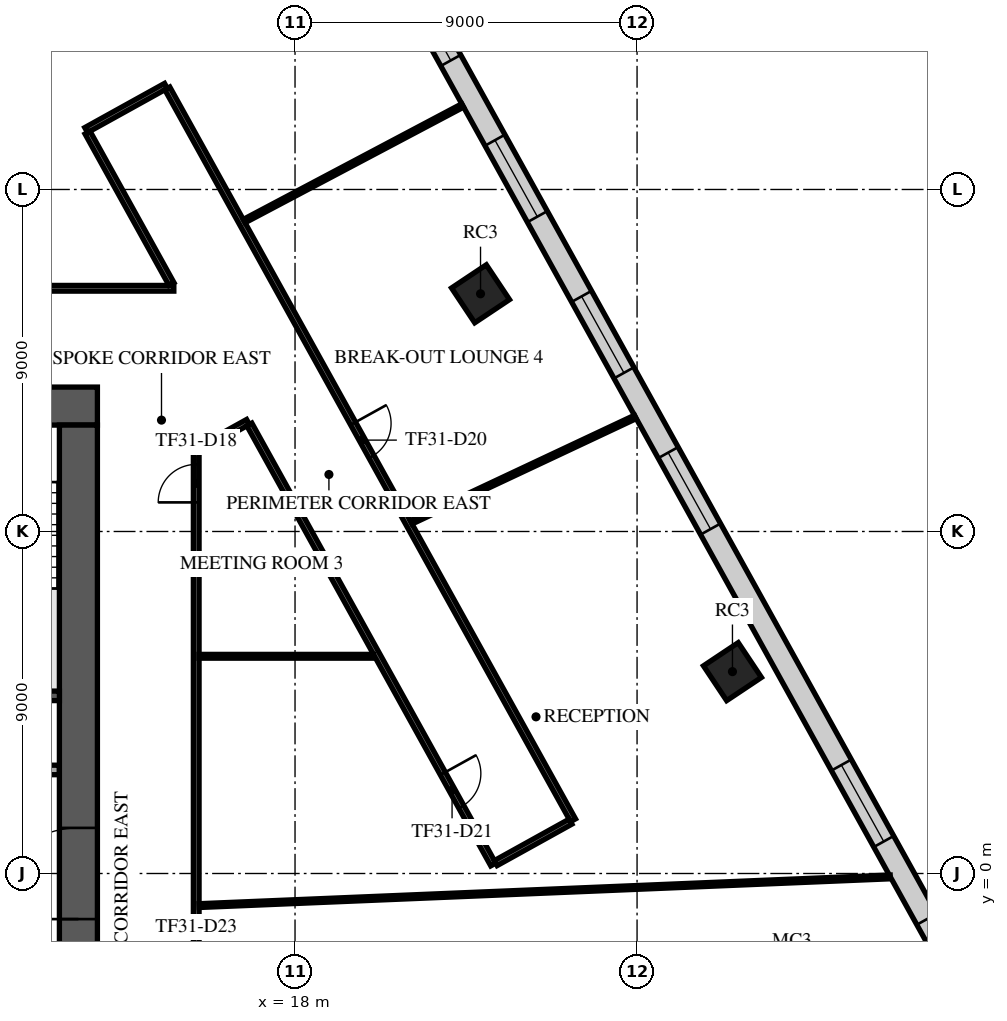
"""IFC4 building model, lengths in metres.
Left out: names, types, materials, properties, quantities, classifications, styles, units other than length and angle.
Written with IfcOpenShell. Run it as: python <this file> out.ifc"""

import sys

from ifc_helpers import new_model, si_unit, direction, frame, frame_2d, origin, origin_2d, place, context, subcontext, project, spatial, rectangle, extrude, element, fill, save


model = new_model("IFC4")
c1 = context("Model", 3, precision=1e-05, world=origin(), true_north=direction((0.0, 1.0)))
c2 = subcontext(c1, "Body", "Model", "MODEL_VIEW")
j1 = project(units=[si_unit("LENGTHUNIT", "METRE"), si_unit("PLANEANGLEUNIT", "RADIAN")], contexts=[c1])
p1 = place(None, origin())
s1 = spatial("IfcSite", under=j1, at=p1, CompositionType="ELEMENT")
p2 = place(p1, origin())
s2 = spatial("IfcBuilding", under=s1, at=p2, CompositionType="ELEMENT")
p3 = place(p2, frame((0.0, 0.0, 139.7)))
s3 = spatial("IfcBuildingStorey", under=s2, at=p3, CompositionType="ELEMENT", Elevation=139.7)
for number, where, z_axis, x_axis in (
    (1, (29.51, 5.312, 0.0), (0.0, 0.0, 1.0), (0.832, 0.555, 0.0)),
    (2, (22.881, 15.255, 0.0), (0.0, 0.0, 1.0), (0.832, 0.555, 0.0)),
):
    element("IfcColumn", number, at=place(p3, frame(where, z_axis=z_axis, x_axis=x_axis)), inside=s3, PredefinedType="COLUMN", context=c2, shape_type="SweptSolid", body=[
        extrude(rectangle(XDim=1.1, YDim=1.1, at=origin_2d()), origin(), (0.0, 0.0, 1.0), 4.0),
    ])
p4 = place(p3, frame((-12.8, 12.3, 0.0), z_axis=(0.0, 0.0, 1.0), x_axis=(1.0, 0.0, 0.0)))
e3 = element("IfcWall", 3, at=p4, inside=s3, PredefinedType="SHEAR", context=c2, shape_type="SweptSolid", body=[
    extrude(rectangle(XDim=25.6, YDim=1.0, at=frame_2d((12.8, 0.0))), origin(), (0.0, 0.0, 1.0), 3.6),
])
p5 = place(p4, frame((11.6, 0.0, 0.0)))
e4 = element("IfcOpeningElement", 4, at=p5, cuts=e3, PredefinedType="OPENING", context=c2, shape_type="SweptSolid", body=[
    extrude(rectangle(XDim=2.4, YDim=2.4, at=frame_2d((1.2, 1.2))), frame((0.0, 0.51, 0.0), z_axis=(0.0, -1.0, 0.0), x_axis=(1.0, 0.0, 0.0)), (0.0, 0.0, 1.0), 1.02),
])
p6 = place(p4, frame((22.425, 0.0, 0.0)))
e5 = element("IfcOpeningElement", 5, at=p6, cuts=e3, PredefinedType="OPENING", context=c2, shape_type="SweptSolid", body=[
    extrude(rectangle(XDim=1.2, YDim=2.1, at=frame_2d((0.6, 1.05))), frame((0.0, 0.51, 0.0), z_axis=(0.0, -1.0, 0.0), x_axis=(1.0, 0.0, 0.0)), (0.0, 0.0, 1.0), 1.02),
])
p7 = place(p4, frame((1.4, 0.0, 0.0)))
e6 = element("IfcOpeningElement", 6, at=p7, cuts=e3, PredefinedType="OPENING", context=c2, shape_type="SweptSolid", body=[
    extrude(rectangle(XDim=1.0, YDim=2.1, at=frame_2d((0.5, 1.05))), frame((0.0, 0.51, 0.0), z_axis=(0.0, -1.0, 0.0), x_axis=(1.0, 0.0, 0.0)), (0.0, 0.0, 1.0), 1.02),
])
p8 = place(p3, frame((12.3, -11.8, 0.0), z_axis=(0.0, 0.0, 1.0), x_axis=(0.0, 1.0, 0.0)))
e7 = element("IfcWall", 7, at=p8, inside=s3, PredefinedType="SHEAR", context=c2, shape_type="SweptSolid", body=[
    extrude(rectangle(XDim=23.6, YDim=1.0, at=frame_2d((11.8, 0.0))), origin(), (0.0, 0.0, 1.0), 3.6),
])
p9 = place(p8, frame((10.6, 0.0, 0.0)))
e8 = element("IfcOpeningElement", 8, at=p9, cuts=e7, PredefinedType="OPENING", context=c2, shape_type="SweptSolid", body=[
    extrude(rectangle(XDim=2.4, YDim=2.4, at=frame_2d((1.2, 1.2))), frame((0.0, 0.51, 0.0), z_axis=(0.0, -1.0, 0.0), x_axis=(1.0, 0.0, 0.0)), (0.0, 0.0, 1.0), 1.02),
])
p10 = place(p3, frame((8.65, 4.675, 0.0), z_axis=(0.0, 0.0, 1.0), x_axis=(1.0, 0.0, 0.0)))
e9 = element("IfcWall", 9, at=p10, inside=s3, PredefinedType="SOLIDWALL", context=c2, shape_type="SweptSolid", body=[
    extrude(rectangle(XDim=3.15, YDim=0.25, at=frame_2d((1.575, 0.0))), origin(), (0.0, 0.0, 1.0), 3.6),
])
p11 = place(p3, frame((8.38, 2.725, 0.0), z_axis=(0.0, 0.0, 1.0), x_axis=(1.0, 0.0, 0.0)))
e10 = element("IfcWall", 10, at=p11, inside=s3, PredefinedType="PARTITIONING", context=c2, shape_type="SweptSolid", body=[
    extrude(rectangle(XDim=3.415, YDim=0.25, at=frame_2d((1.708, 0.0))), origin(), (0.0, 0.0, 1.0), 3.6),
])
p12 = place(p11, frame((1.17, 0.0, 0.0)))
e11 = element("IfcOpeningElement", 11, at=p12, cuts=e10, PredefinedType="OPENING", context=c2, shape_type="SweptSolid", body=[
    extrude(rectangle(XDim=0.9, YDim=2.1, at=frame_2d((0.45, 1.05))), frame((0.0, 0.135, 0.0), z_axis=(0.0, -1.0, 0.0), x_axis=(1.0, 0.0, 0.0)), (0.0, 0.0, 1.0), 0.27),
])
p13 = place(p3, frame((36.291, -4.209, 0.0), z_axis=(0.0, 0.0, 1.0), x_axis=(-0.484811111615, 0.874618880458, 0.0)))
e12 = element("IfcWall", 12, at=p13, inside=s3, PredefinedType="STANDARD", context=c2, shape_type="SweptSolid", body=[
    extrude(rectangle(XDim=42.176, YDim=0.6, at=frame_2d((21.088, 0.0))), origin(), (0.0, 0.0, 1.0), 3.6),
])
p14 = place(p13, frame((1.138, 0.0, 0.9)))
e13 = element("IfcOpeningElement", 13, at=p14, cuts=e12, PredefinedType="OPENING", context=c2, shape_type="SweptSolid", body=[
    extrude(rectangle(XDim=2.3, YDim=2.1, at=frame_2d((1.15, 1.05))), frame((0.0, 0.31, 0.0), z_axis=(0.0, -1.0, 0.0), x_axis=(1.0, 0.0, 0.0)), (0.0, 0.0, 1.0), 0.62),
])
p15 = place(p13, frame((5.776, 0.0, 0.9)))
e14 = element("IfcOpeningElement", 14, at=p15, cuts=e12, PredefinedType="OPENING", context=c2, shape_type="SweptSolid", body=[
    extrude(rectangle(XDim=2.3, YDim=2.1, at=frame_2d((1.15, 1.05))), frame((0.0, 0.31, 0.0), z_axis=(0.0, -1.0, 0.0), x_axis=(1.0, 0.0, 0.0)), (0.0, 0.0, 1.0), 0.62),
])
p16 = place(p13, frame((15.176, 0.0, 0.9)))
e15 = element("IfcOpeningElement", 15, at=p16, cuts=e12, PredefinedType="OPENING", context=c2, shape_type="SweptSolid", body=[
    extrude(rectangle(XDim=2.3, YDim=2.1, at=frame_2d((1.15, 1.05))), frame((0.0, 0.31, 0.0), z_axis=(0.0, -1.0, 0.0), x_axis=(1.0, 0.0, 0.0)), (0.0, 0.0, 1.0), 0.62),
])
p17 = place(p13, frame((19.876, 0.0, 0.9)))
e16 = element("IfcOpeningElement", 16, at=p17, cuts=e12, PredefinedType="OPENING", context=c2, shape_type="SweptSolid", body=[
    extrude(rectangle(XDim=2.3, YDim=2.1, at=frame_2d((1.15, 1.05))), frame((0.0, 0.31, 0.0), z_axis=(0.0, -1.0, 0.0), x_axis=(1.0, 0.0, 0.0)), (0.0, 0.0, 1.0), 0.62),
])
p18 = place(p13, frame((24.576, 0.0, 0.9)))
e17 = element("IfcOpeningElement", 17, at=p18, cuts=e12, PredefinedType="OPENING", context=c2, shape_type="SweptSolid", body=[
    extrude(rectangle(XDim=2.3, YDim=2.1, at=frame_2d((1.15, 1.05))), frame((0.0, 0.31, 0.0), z_axis=(0.0, -1.0, 0.0), x_axis=(1.0, 0.0, 0.0)), (0.0, 0.0, 1.0), 0.62),
])
p19 = place(p13, frame((29.276, 0.0, 0.9)))
e18 = element("IfcOpeningElement", 18, at=p19, cuts=e12, PredefinedType="OPENING", context=c2, shape_type="SweptSolid", body=[
    extrude(rectangle(XDim=2.3, YDim=2.1, at=frame_2d((1.15, 1.05))), frame((0.0, 0.31, 0.0), z_axis=(0.0, -1.0, 0.0), x_axis=(1.0, 0.0, 0.0)), (0.0, 0.0, 1.0), 0.62),
])
p20 = place(p13, frame((33.976, 0.0, 0.9)))
e19 = element("IfcOpeningElement", 19, at=p20, cuts=e12, PredefinedType="OPENING", context=c2, shape_type="SweptSolid", body=[
    extrude(rectangle(XDim=2.3, YDim=2.1, at=frame_2d((1.15, 1.05))), frame((0.0, 0.31, 0.0), z_axis=(0.0, -1.0, 0.0), x_axis=(1.0, 0.0, 0.0)), (0.0, 0.0, 1.0), 0.62),
])
p21 = place(p13, frame((38.676, 0.0, 0.9)))
e20 = element("IfcOpeningElement", 20, at=p21, cuts=e12, PredefinedType="OPENING", context=c2, shape_type="SweptSolid", body=[
    extrude(rectangle(XDim=2.3, YDim=2.1, at=frame_2d((1.15, 1.05))), frame((0.0, 0.31, 0.0), z_axis=(0.0, -1.0, 0.0), x_axis=(1.0, 0.0, 0.0)), (0.0, 0.0, 1.0), 0.62),
])
p22 = place(p3, frame((-3.075, 15.4, 0.0), z_axis=(0.0, 0.0, 1.0), x_axis=(1.0, 0.0, 0.0)))
e21 = element("IfcWall", 21, at=p22, inside=s3, PredefinedType="PARTITIONING", context=c2, shape_type="SweptSolid", body=[
    extrude(rectangle(XDim=17.886, YDim=0.15, at=frame_2d((8.943, 0.0))), origin(), (0.0, 0.0, 1.0), 3.15),
])
p23 = place(p22, frame((10.17, 0.0, 0.0)))
e22 = element("IfcOpeningElement", 22, at=p23, cuts=e21, PredefinedType="OPENING", context=c2, shape_type="SweptSolid", body=[
    extrude(rectangle(XDim=1.8, YDim=2.1, at=frame_2d((0.9, 1.05))), frame((0.0, 0.085, 0.0), z_axis=(0.0, -1.0, 0.0), x_axis=(1.0, 0.0, 0.0)), (0.0, 0.0, 1.0), 0.17),
])
p24 = place(p3, frame((12.504, 19.563, 0.0), z_axis=(0.0, 0.0, 1.0), x_axis=(0.874703778473, 0.484657920522, 0.0)))
e23 = element("IfcWall", 23, at=p24, inside=s3, PredefinedType="PARTITIONING", context=c2, shape_type="SweptSolid", body=[
    extrude(rectangle(XDim=2.4, YDim=0.15, at=frame_2d((1.2, 0.0))), origin(), (0.0, 0.0, 1.0), 3.15),
])
p25 = place(p3, frame((12.54, 19.497, 0.0), z_axis=(0.0, 0.0, 1.0), x_axis=(0.48474201542, -0.874657177691, 0.0)))
e24 = element("IfcWall", 24, at=p25, inside=s3, PredefinedType="PARTITIONING", context=c2, shape_type="SweptSolid", body=[
    extrude(rectangle(XDim=4.557, YDim=0.15, at=frame_2d((2.279, 0.0))), origin(), (0.0, 0.0, 1.0), 3.15),
])
p26 = place(p3, frame((14.639, 20.66, 0.0), z_axis=(0.0, 0.0, 1.0), x_axis=(0.484803020703, -0.874623365294, 0.0)))
e25 = element("IfcWall", 25, at=p26, inside=s3, PredefinedType="PARTITIONING", context=c2, shape_type="SweptSolid", body=[
    extrude(rectangle(XDim=22.02, YDim=0.15, at=frame_2d((11.01, 0.0))), origin(), (0.0, 0.0, 1.0), 3.15),
])
p27 = place(p26, frame((10.083, 0.0, 0.0)))
e26 = element("IfcOpeningElement", 26, at=p27, cuts=e25, PredefinedType="OPENING", context=c2, shape_type="SweptSolid", body=[
    extrude(rectangle(XDim=1.0, YDim=2.1, at=frame_2d((0.5, 1.05))), frame((0.0, 0.085, 0.0), z_axis=(0.0, -1.0, 0.0), x_axis=(1.0, 0.0, 0.0)), (0.0, 0.0, 1.0), 0.17),
])
p28 = place(p3, frame((15.4, -10.568, 0.0), z_axis=(0.0, 0.0, 1.0), x_axis=(0.0, 1.0, 0.0)))
e27 = element("IfcWall", 27, at=p28, inside=s3, PredefinedType="PARTITIONING", context=c2, shape_type="SweptSolid", body=[
    extrude(rectangle(XDim=21.695, YDim=0.15, at=frame_2d((10.847, 0.0))), origin(), (0.0, 0.0, 1.0), 3.15),
])
p29 = place(p28, frame((20.333, 0.0, 0.0)))
e28 = element("IfcOpeningElement", 28, at=p29, cuts=e27, PredefinedType="OPENING", context=c2, shape_type="SweptSolid", body=[
    extrude(rectangle(XDim=1.0, YDim=2.1, at=frame_2d((0.5, 1.05))), frame((0.0, 0.085, 0.0), z_axis=(0.0, -1.0, 0.0), x_axis=(1.0, 0.0, 0.0)), (0.0, 0.0, 1.0), 0.17),
])
p30 = place(p28, frame((7.55, 0.0, 0.0)))
e29 = element("IfcOpeningElement", 29, at=p30, cuts=e27, PredefinedType="OPENING", context=c2, shape_type="SweptSolid", body=[
    extrude(rectangle(XDim=1.0, YDim=2.1, at=frame_2d((0.5, 1.05))), frame((0.0, 0.085, 0.0), z_axis=(0.0, -1.0, 0.0), x_axis=(1.0, 0.0, 0.0)), (0.0, 0.0, 1.0), 0.17),
])
p31 = place(p3, frame((15.511, 11.189, 0.0), z_axis=(0.0, 0.0, 1.0), x_axis=(0.874559677803, 0.484917900227, 0.0)))
e30 = element("IfcWall", 30, at=p31, inside=s3, PredefinedType="PARTITIONING", context=c2, shape_type="SweptSolid", body=[
    extrude(rectangle(XDim=1.43, YDim=0.15, at=frame_2d((0.715, 0.0))), origin(), (0.0, 0.0, 1.0), 3.6),
])
p32 = place(p3, frame((16.798, 11.816, 0.0), z_axis=(0.0, 0.0, 1.0), x_axis=(0.484762728721, -0.874645697893, 0.0)))
e31 = element("IfcWall", 31, at=p32, inside=s3, PredefinedType="PARTITIONING", context=c2, shape_type="SweptSolid", body=[
    extrude(rectangle(XDim=13.239, YDim=0.15, at=frame_2d((6.62, 0.0))), origin(), (0.0, 0.0, 1.0), 3.15),
])
p33 = place(p32, frame((10.503, 0.0, 0.0)))
e32 = element("IfcOpeningElement", 32, at=p33, cuts=e31, PredefinedType="OPENING", context=c2, shape_type="SweptSolid", body=[
    extrude(rectangle(XDim=1.0, YDim=2.1, at=frame_2d((0.5, 1.05))), frame((0.0, 0.085, 0.0), z_axis=(0.0, -1.0, 0.0), x_axis=(1.0, 0.0, 0.0)), (0.0, 0.0, 1.0), 0.17),
])
p34 = place(p3, frame((23.281, 0.273, 0.0), z_axis=(0.0, 0.0, 1.0), x_axis=(0.874586823728, 0.484868938747, 0.0)))
e33 = element("IfcWall", 33, at=p34, inside=s3, PredefinedType="PARTITIONING", context=c2, shape_type="SweptSolid", body=[
    extrude(rectangle(XDim=2.25, YDim=0.15, at=frame_2d((1.125, 0.0))), origin(), (0.0, 0.0, 1.0), 3.15),
])
p35 = place(p3, frame((15.475, 5.716, 0.0), z_axis=(0.0, 0.0, 1.0), x_axis=(1.0, 0.0, 0.0)))
e34 = element("IfcWall", 34, at=p35, inside=s3, PredefinedType="PARTITIONING", context=c2, shape_type="SweptSolid", body=[
    extrude(rectangle(XDim=4.59, YDim=0.1, at=frame_2d((2.295, 0.0))), origin(), (0.0, 0.0, 1.0), 3.03),
])
p36 = place(p3, frame((15.477, -0.845, 0.0), z_axis=(0.0, 0.0, 1.0), x_axis=(0.999139523849, 0.041475437099, 0.0)))
e35 = element("IfcWall", 35, at=p36, inside=s3, PredefinedType="PARTITIONING", context=c2, shape_type="SweptSolid", body=[
    extrude(rectangle(XDim=18.201, YDim=0.1, at=frame_2d((9.1, 0.0))), origin(), (0.0, 0.0, 1.0), 3.6),
])
p37 = place(p3, frame((16.662, 17.168, 0.0), z_axis=(0.0, 0.0, 1.0), x_axis=(0.883911173827, 0.467654826538, 0.0)))
e36 = element("IfcWall", 36, at=p37, inside=s3, PredefinedType="PARTITIONING", context=c2, shape_type="SweptSolid", body=[
    extrude(rectangle(XDim=6.503, YDim=0.1, at=frame_2d((3.251, 0.0))), origin(), (0.0, 0.0, 1.0), 3.15),
])
p38 = place(p3, frame((21.058, 9.242, 0.0), z_axis=(0.0, 0.0, 1.0), x_axis=(0.905003789347, 0.425403504062, 0.0)))
e37 = element("IfcWall", 37, at=p38, inside=s3, PredefinedType="PARTITIONING", context=c2, shape_type="SweptSolid", body=[
    extrude(rectangle(XDim=6.514, YDim=0.1, at=frame_2d((3.257, 0.0))), origin(), (0.0, 0.0, 1.0), 3.15),
])
p39 = place(p9, origin())
e38 = element("IfcDoor", 38, at=p39, inside=s3, OperationType="SINGLE_SWING_LEFT", PredefinedType="DOOR", context=c2, shape_type="SweptSolid", body=[
    extrude(rectangle(XDim=2.4, YDim=2.4, at=frame_2d((1.2, 1.2))), frame((0.0, 0.025, 0.0), z_axis=(0.0, -1.0, 0.0), x_axis=(1.0, 0.0, 0.0)), (0.0, 0.0, 1.0), 0.05),
])
fill(e8, e38)
p40 = place(p14, origin())
e39 = element("IfcWindow", 39, at=p40, inside=s3, PartitioningType="SINGLE_PANEL", PredefinedType="WINDOW", context=c2, shape_type="SweptSolid", body=[
    extrude(rectangle(XDim=2.3, YDim=2.1, at=frame_2d((1.15, 1.05))), frame((0.0, 0.03, 0.0), z_axis=(0.0, -1.0, 0.0), x_axis=(1.0, 0.0, 0.0)), (0.0, 0.0, 1.0), 0.06),
])
fill(e13, e39)
p41 = place(p15, origin())
e40 = element("IfcWindow", 40, at=p41, inside=s3, PartitioningType="SINGLE_PANEL", PredefinedType="WINDOW", context=c2, shape_type="SweptSolid", body=[
    extrude(rectangle(XDim=2.3, YDim=2.1, at=frame_2d((1.15, 1.05))), frame((0.0, 0.03, 0.0), z_axis=(0.0, -1.0, 0.0), x_axis=(1.0, 0.0, 0.0)), (0.0, 0.0, 1.0), 0.06),
])
fill(e14, e40)
p42 = place(p16, origin())
e41 = element("IfcWindow", 41, at=p42, inside=s3, PartitioningType="SINGLE_PANEL", PredefinedType="WINDOW", context=c2, shape_type="SweptSolid", body=[
    extrude(rectangle(XDim=2.3, YDim=2.1, at=frame_2d((1.15, 1.05))), frame((0.0, 0.03, 0.0), z_axis=(0.0, -1.0, 0.0), x_axis=(1.0, 0.0, 0.0)), (0.0, 0.0, 1.0), 0.06),
])
fill(e15, e41)
p43 = place(p17, origin())
e42 = element("IfcWindow", 42, at=p43, inside=s3, PartitioningType="SINGLE_PANEL", PredefinedType="WINDOW", context=c2, shape_type="SweptSolid", body=[
    extrude(rectangle(XDim=2.3, YDim=2.1, at=frame_2d((1.15, 1.05))), frame((0.0, 0.03, 0.0), z_axis=(0.0, -1.0, 0.0), x_axis=(1.0, 0.0, 0.0)), (0.0, 0.0, 1.0), 0.06),
])
fill(e16, e42)
p44 = place(p18, origin())
e43 = element("IfcWindow", 43, at=p44, inside=s3, PartitioningType="SINGLE_PANEL", PredefinedType="WINDOW", context=c2, shape_type="SweptSolid", body=[
    extrude(rectangle(XDim=2.3, YDim=2.1, at=frame_2d((1.15, 1.05))), frame((0.0, 0.03, 0.0), z_axis=(0.0, -1.0, 0.0), x_axis=(1.0, 0.0, 0.0)), (0.0, 0.0, 1.0), 0.06),
])
fill(e17, e43)
p45 = place(p19, origin())
e44 = element("IfcWindow", 44, at=p45, inside=s3, PartitioningType="SINGLE_PANEL", PredefinedType="WINDOW", context=c2, shape_type="SweptSolid", body=[
    extrude(rectangle(XDim=2.3, YDim=2.1, at=frame_2d((1.15, 1.05))), frame((0.0, 0.03, 0.0), z_axis=(0.0, -1.0, 0.0), x_axis=(1.0, 0.0, 0.0)), (0.0, 0.0, 1.0), 0.06),
])
fill(e18, e44)
p46 = place(p29, frame((1.0, 0.0, 0.0), z_axis=(0.0, 0.0, 1.0), x_axis=(-1.0, 0.0, 0.0)))
e45 = element("IfcDoor", 45, at=p46, inside=s3, OperationType="SINGLE_SWING_LEFT", PredefinedType="DOOR", context=c2, shape_type="SweptSolid", body=[
    extrude(rectangle(XDim=1.0, YDim=2.1, at=frame_2d((0.5, 1.05))), frame((0.0, 0.025, 0.0), z_axis=(0.0, -1.0, 0.0), x_axis=(1.0, 0.0, 0.0)), (0.0, 0.0, 1.0), 0.05),
])
fill(e28, e45)
p47 = place(p27, origin())
e46 = element("IfcDoor", 46, at=p47, inside=s3, OperationType="SINGLE_SWING_RIGHT", PredefinedType="DOOR", context=c2, shape_type="SweptSolid", body=[
    extrude(rectangle(XDim=1.0, YDim=2.1, at=frame_2d((0.5, 1.05))), frame((0.0, 0.025, 0.0), z_axis=(0.0, -1.0, 0.0), x_axis=(1.0, 0.0, 0.0)), (0.0, 0.0, 1.0), 0.05),
])
fill(e26, e46)
p48 = place(p33, frame((1.0, 0.0, 0.0), z_axis=(0.0, 0.0, 1.0), x_axis=(-1.0, 0.0, 0.0)))
e47 = element("IfcDoor", 47, at=p48, inside=s3, OperationType="SINGLE_SWING_RIGHT", PredefinedType="DOOR", context=c2, shape_type="SweptSolid", body=[
    extrude(rectangle(XDim=1.0, YDim=2.1, at=frame_2d((0.5, 1.05))), frame((0.0, 0.025, 0.0), z_axis=(0.0, -1.0, 0.0), x_axis=(1.0, 0.0, 0.0)), (0.0, 0.0, 1.0), 0.05),
])
fill(e32, e47)
save(model, sys.argv[1])
